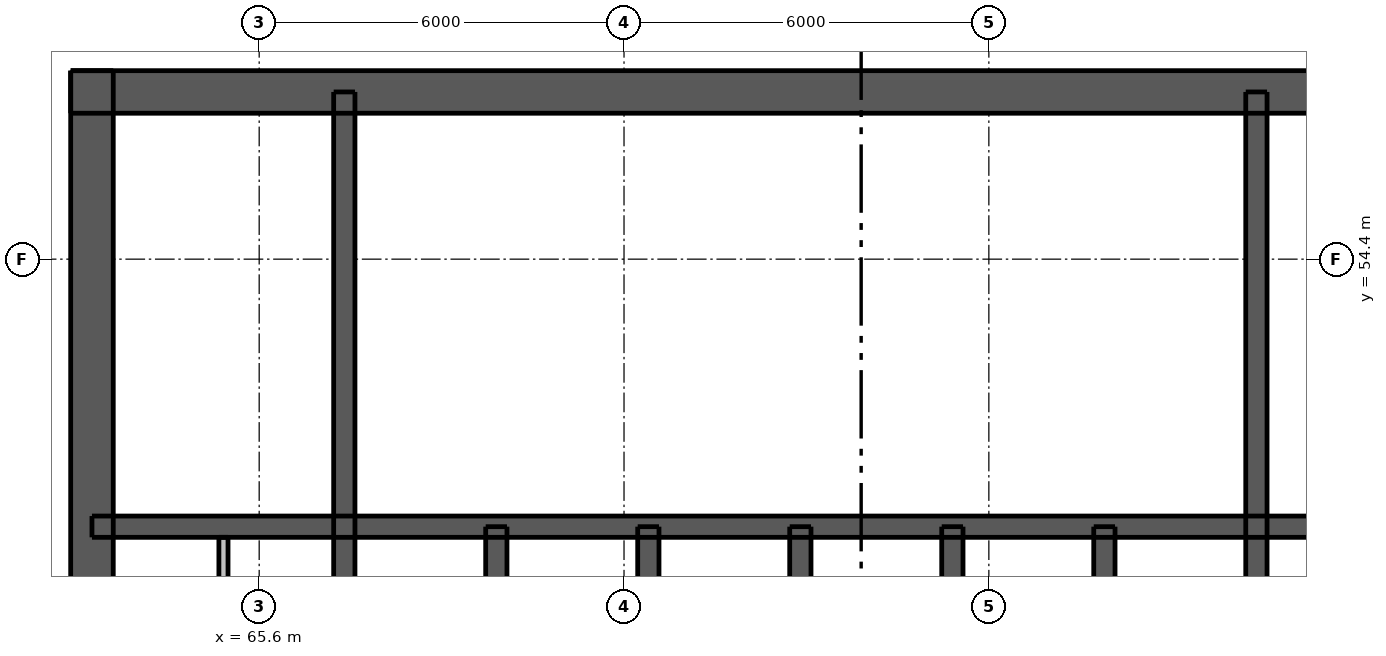
"""IFC4 building model, lengths in metres.
Left out: names, types, materials, properties, quantities, classifications, styles, units other than length and angle.
Written with IfcOpenShell. Run it as: python <this file> out.ifc"""

import sys

from ifc_helpers import new_model, si_unit, direction, frame, frame_2d, origin, place, context, subcontext, project, spatial, rectangle, extrude, element, fill, save


model = new_model("IFC4")
c1 = context("Model", 3, precision=1e-05, world=origin(), true_north=direction((0.0, 1.0)))
c2 = subcontext(c1, "Body", "Model", "MODEL_VIEW")
j1 = project(units=[si_unit("LENGTHUNIT", "METRE"), si_unit("PLANEANGLEUNIT", "RADIAN")], contexts=[c1])
p1 = place(None, origin())
s1 = spatial("IfcSite", under=j1, at=p1, CompositionType="ELEMENT")
p2 = place(p1, origin())
s2 = spatial("IfcBuilding", under=s1, at=p2, CompositionType="ELEMENT")
p3 = place(p2, frame((0.0, 0.0, 161.5)))
s3 = spatial("IfcBuildingStorey", under=s2, at=p3, CompositionType="ELEMENT", Elevation=161.5)
p4 = place(p3, frame((62.5, 57.15, 0.0), z_axis=(0.0, 0.0, 1.0), x_axis=(1.0, 0.0, 0.0)))
e1 = element("IfcWall", 1, at=p4, inside=s3, PredefinedType="SHEAR", context=c2, shape_type="SweptSolid", body=[
    extrude(rectangle(XDim=24.0, YDim=0.7, at=frame_2d((12.0, 0.0))), origin(), (0.0, 0.0, 1.0), 3.05),
])
p5 = place(p4, frame((20.938, 0.0, 0.0)))
e2 = element("IfcOpeningElement", 2, at=p5, cuts=e1, PredefinedType="OPENING", context=c2, shape_type="SweptSolid", body=[
    extrude(rectangle(XDim=1.1, YDim=2.1, at=frame_2d((0.55, 1.05))), frame((0.0, 0.36, 0.0), z_axis=(0.0, -1.0, 0.0), x_axis=(1.0, 0.0, 0.0)), (0.0, 0.0, 1.0), 0.72),
])
p6 = place(p4, frame((1.962, 0.0, 0.0)))
e3 = element("IfcOpeningElement", 3, at=p6, cuts=e1, PredefinedType="OPENING", context=c2, shape_type="SweptSolid", body=[
    extrude(rectangle(XDim=1.1, YDim=2.1, at=frame_2d((0.55, 1.05))), frame((0.0, 0.36, 0.0), z_axis=(0.0, -1.0, 0.0), x_axis=(1.0, 0.0, 0.0)), (0.0, 0.0, 1.0), 0.72),
])
p7 = place(p4, frame((11.55, 0.0, 0.0)))
e4 = element("IfcOpeningElement", 4, at=p7, cuts=e1, PredefinedType="OPENING", context=c2, shape_type="SweptSolid", body=[
    extrude(rectangle(XDim=0.9, YDim=2.1, at=frame_2d((0.45, 1.05))), frame((0.0, 0.36, 0.0), z_axis=(0.0, -1.0, 0.0), x_axis=(1.0, 0.0, 0.0)), (0.0, 0.0, 1.0), 0.72),
])
p8 = place(p3, frame((62.85, 33.5, 0.0), z_axis=(0.0, 0.0, 1.0), x_axis=(0.0, 1.0, 0.0)))
e5 = element("IfcWall", 5, at=p8, inside=s3, PredefinedType="SHEAR", context=c2, shape_type="SweptSolid", body=[
    extrude(rectangle(XDim=24.0, YDim=0.7, at=frame_2d((12.0, 0.0))), origin(), (0.0, 0.0, 1.0), 3.05),
])
p9 = place(p8, frame((11.2, 0.0, 0.0)))
e6 = element("IfcOpeningElement", 6, at=p9, cuts=e5, PredefinedType="OPENING", context=c2, shape_type="SweptSolid", body=[
    extrude(rectangle(XDim=1.6, YDim=2.1, at=frame_2d((0.8, 1.05))), frame((0.0, 0.36, 0.0), z_axis=(0.0, -1.0, 0.0), x_axis=(1.0, 0.0, 0.0)), (0.0, 0.0, 1.0), 0.72),
])
p10 = place(p3, frame((62.85, 50.0, 0.0), z_axis=(0.0, 0.0, 1.0), x_axis=(1.0, 0.0, 0.0)))
e7 = element("IfcWall", 7, at=p10, inside=s3, PredefinedType="SHEAR", context=c2, shape_type="SweptSolid", body=[
    extrude(rectangle(XDim=23.3, YDim=0.35, at=frame_2d((11.65, 0.0))), origin(), (0.0, 0.0, 1.0), 3.05),
])
for number, where, z_axis, x_axis in (
    (8, (67.0, 47.1, 0.0), (0.0, 0.0, 1.0), (0.0, 1.0, 0.0)),
    (9, (82.0, 47.1, 0.0), (0.0, 0.0, 1.0), (0.0, 1.0, 0.0)),
):
    element("IfcWall", number, at=place(p3, frame(where, z_axis=z_axis, x_axis=x_axis)), inside=s3, PredefinedType="SHEAR", context=c2, shape_type="SweptSolid", body=[
        extrude(rectangle(XDim=10.05, YDim=0.35, at=frame_2d((5.025, 0.0))), origin(), (0.0, 0.0, 1.0), 3.05),
    ])
for number, where, z_axis, x_axis in (
    (10, (69.5, 47.1, 0.0), (0.0, 0.0, 1.0), (0.0, 1.0, 0.0)),
    (11, (72.0, 47.1, 0.0), (0.0, 0.0, 1.0), (0.0, 1.0, 0.0)),
    (12, (74.5, 47.1, 0.0), (0.0, 0.0, 1.0), (0.0, 1.0, 0.0)),
    (13, (77.0, 47.1, 0.0), (0.0, 0.0, 1.0), (0.0, 1.0, 0.0)),
    (14, (79.5, 47.1, 0.0), (0.0, 0.0, 1.0), (0.0, 1.0, 0.0)),
):
    element("IfcWall", number, at=place(p3, frame(where, z_axis=z_axis, x_axis=x_axis)), inside=s3, PredefinedType="SHEAR", context=c2, shape_type="SweptSolid", body=[
        extrude(rectangle(XDim=2.9, YDim=0.35, at=frame_2d((1.45, 0.0))), origin(), (0.0, 0.0, 1.0), 3.05),
    ])
p11 = place(p3, frame((65.012, 47.275, 0.0), z_axis=(0.0, 0.0, 1.0), x_axis=(0.0, 1.0, 0.0)))
e15 = element("IfcWall", 15, at=p11, inside=s3, PredefinedType="PLUMBINGWALL", context=c2, shape_type="SweptSolid", body=[
    extrude(rectangle(XDim=2.55, YDim=0.15, at=frame_2d((1.275, 0.0))), origin(), (0.0, 0.0, 1.0), 3.05),
])
p12 = place(p6, origin())
e16 = element("IfcDoor", 16, at=p12, inside=s3, OperationType="SINGLE_SWING_LEFT", PredefinedType="DOOR", context=c2, shape_type="SweptSolid", body=[
    extrude(rectangle(XDim=1.1, YDim=2.1, at=frame_2d((0.55, 1.05))), frame((0.0, -0.288, 0.0), z_axis=(0.0, -1.0, 0.0), x_axis=(1.0, 0.0, 0.0)), (0.0, 0.0, 1.0), 0.05),
])
fill(e3, e16)
p13 = place(p7, origin())
e17 = element("IfcDoor", 17, at=p13, inside=s3, OperationType="SINGLE_SWING_RIGHT", PredefinedType="DOOR", context=c2, shape_type="SweptSolid", body=[
    extrude(rectangle(XDim=0.9, YDim=2.1, at=frame_2d((0.45, 1.05))), frame((0.0, -0.288, 0.0), z_axis=(0.0, -1.0, 0.0), x_axis=(1.0, 0.0, 0.0)), (0.0, 0.0, 1.0), 0.05),
])
fill(e4, e17)
save(model, sys.argv[1])
